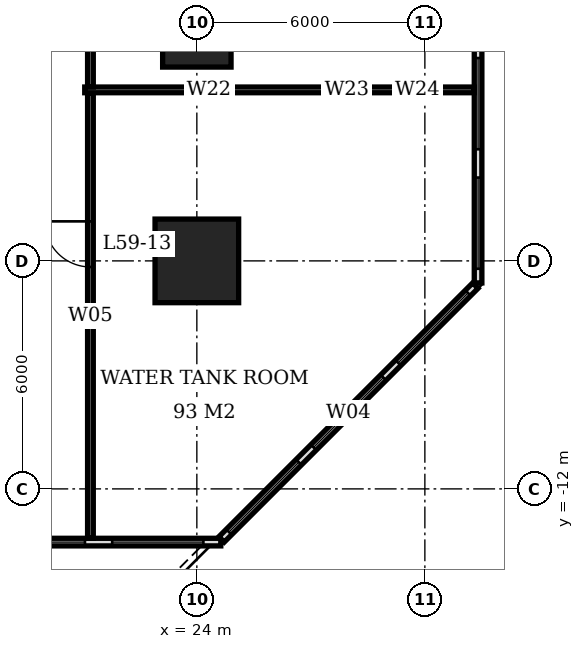
"""IFC4 building model, lengths in metres.
Left out: names, types, materials, properties, quantities, classifications, styles, units other than length and angle.
Written with IfcOpenShell. Run it as: python <this file> out.ifc"""

import sys

from ifc_helpers import new_model, si_unit, direction, frame, frame_2d, origin, origin_2d, place, context, subcontext, project, spatial, rectangle, extrude, element, fill, save


model = new_model("IFC4")
c1 = context("Model", 3, precision=1e-05, world=origin(), true_north=direction((0.0, 1.0)))
c2 = subcontext(c1, "Body", "Model", "MODEL_VIEW")
j1 = project(units=[si_unit("LENGTHUNIT", "METRE"), si_unit("PLANEANGLEUNIT", "RADIAN")], contexts=[c1])
p1 = place(None, origin())
s1 = spatial("IfcSite", under=j1, at=p1, CompositionType="ELEMENT")
p2 = place(p1, origin())
s2 = spatial("IfcBuilding", under=s1, at=p2, CompositionType="ELEMENT")
p3 = place(p2, frame((0.0, 0.0, 239.6)))
s3 = spatial("IfcBuildingStorey", under=s2, at=p3, CompositionType="ELEMENT", Elevation=239.6)
p4 = place(p3, frame((24.0, -6.0, 0.0), z_axis=(0.0, 0.0, 1.0), x_axis=(1.0, 0.0, 0.0)))
e1 = element("IfcColumn", 1, at=p4, inside=s3, PredefinedType="COLUMN", context=c2, shape_type="SweptSolid", body=[
    extrude(rectangle(XDim=2.2, YDim=2.2, at=origin_2d()), origin(), (0.0, 0.0, 1.0), 5.4),
])
p5 = place(p3, frame((24.0, 0.0, 0.0), z_axis=(0.0, 0.0, 1.0), x_axis=(1.0, 0.0, 0.0)))
e2 = element("IfcColumn", 2, at=p5, inside=s3, PredefinedType="COLUMN", context=c2, shape_type="SweptSolid", body=[
    extrude(rectangle(XDim=1.8, YDim=1.8, at=origin_2d()), origin(), (0.0, 0.0, 1.0), 5.4),
])
p6 = place(p3, frame((-6.63, -13.4, 0.0), z_axis=(0.0, 0.0, 1.0), x_axis=(1.0, 0.0, 0.0)))
e3 = element("IfcWall", 3, at=p6, inside=s3, PredefinedType="USERDEFINED", context=c2, shape_type="SweptSolid", body=[
    extrude(rectangle(XDim=31.26, YDim=0.2, at=frame_2d((15.63, 0.0))), origin(), (0.0, 0.0, 1.0), 5.4),
])
p7 = place(p6, frame((0.358, 0.0, 0.6)))
e4 = element("IfcOpeningElement", 4, at=p7, cuts=e3, PredefinedType="OPENING", context=c2, shape_type="SweptSolid", body=[
    extrude(rectangle(XDim=2.4, YDim=3.0, at=frame_2d((1.2, 1.5))), frame((0.0, 0.11, 0.0), z_axis=(0.0, -1.0, 0.0), x_axis=(1.0, 0.0, 0.0)), (0.0, 0.0, 1.0), 0.22),
])
p8 = place(p6, frame((3.474, 0.0, 0.6)))
e5 = element("IfcOpeningElement", 5, at=p8, cuts=e3, PredefinedType="OPENING", context=c2, shape_type="SweptSolid", body=[
    extrude(rectangle(XDim=2.4, YDim=3.0, at=frame_2d((1.2, 1.5))), frame((0.0, 0.11, 0.0), z_axis=(0.0, -1.0, 0.0), x_axis=(1.0, 0.0, 0.0)), (0.0, 0.0, 1.0), 0.22),
])
p9 = place(p6, frame((6.59, 0.0, 0.6)))
e6 = element("IfcOpeningElement", 6, at=p9, cuts=e3, PredefinedType="OPENING", context=c2, shape_type="SweptSolid", body=[
    extrude(rectangle(XDim=2.4, YDim=3.0, at=frame_2d((1.2, 1.5))), frame((0.0, 0.11, 0.0), z_axis=(0.0, -1.0, 0.0), x_axis=(1.0, 0.0, 0.0)), (0.0, 0.0, 1.0), 0.22),
])
p10 = place(p6, frame((9.706, 0.0, 0.6)))
e7 = element("IfcOpeningElement", 7, at=p10, cuts=e3, PredefinedType="OPENING", context=c2, shape_type="SweptSolid", body=[
    extrude(rectangle(XDim=2.4, YDim=3.0, at=frame_2d((1.2, 1.5))), frame((0.0, 0.11, 0.0), z_axis=(0.0, -1.0, 0.0), x_axis=(1.0, 0.0, 0.0)), (0.0, 0.0, 1.0), 0.22),
])
p11 = place(p6, frame((13.572, 0.0, 0.0)))
e8 = element("IfcOpeningElement", 8, at=p11, cuts=e3, PredefinedType="OPENING", context=c2, shape_type="SweptSolid", body=[
    extrude(rectangle(XDim=1.0, YDim=2.1, at=frame_2d((0.5, 1.05))), frame((0.0, 0.11, 0.0), z_axis=(0.0, -1.0, 0.0), x_axis=(1.0, 0.0, 0.0)), (0.0, 0.0, 1.0), 0.22),
])
p12 = place(p6, frame((15.938, 0.0, 0.6)))
e9 = element("IfcOpeningElement", 9, at=p12, cuts=e3, PredefinedType="OPENING", context=c2, shape_type="SweptSolid", body=[
    extrude(rectangle(XDim=2.4, YDim=3.0, at=frame_2d((1.2, 1.5))), frame((0.0, 0.11, 0.0), z_axis=(0.0, -1.0, 0.0), x_axis=(1.0, 0.0, 0.0)), (0.0, 0.0, 1.0), 0.22),
])
p13 = place(p6, frame((19.054, 0.0, 0.6)))
e10 = element("IfcOpeningElement", 10, at=p13, cuts=e3, PredefinedType="OPENING", context=c2, shape_type="SweptSolid", body=[
    extrude(rectangle(XDim=2.4, YDim=3.0, at=frame_2d((1.2, 1.5))), frame((0.0, 0.11, 0.0), z_axis=(0.0, -1.0, 0.0), x_axis=(1.0, 0.0, 0.0)), (0.0, 0.0, 1.0), 0.22),
])
p14 = place(p6, frame((22.17, 0.0, 0.6)))
e11 = element("IfcOpeningElement", 11, at=p14, cuts=e3, PredefinedType="OPENING", context=c2, shape_type="SweptSolid", body=[
    extrude(rectangle(XDim=2.4, YDim=3.0, at=frame_2d((1.2, 1.5))), frame((0.0, 0.11, 0.0), z_axis=(0.0, -1.0, 0.0), x_axis=(1.0, 0.0, 0.0)), (0.0, 0.0, 1.0), 0.22),
])
p15 = place(p6, frame((25.286, 0.0, 0.6)))
e12 = element("IfcOpeningElement", 12, at=p15, cuts=e3, PredefinedType="OPENING", context=c2, shape_type="SweptSolid", body=[
    extrude(rectangle(XDim=2.4, YDim=3.0, at=frame_2d((1.2, 1.5))), frame((0.0, 0.11, 0.0), z_axis=(0.0, -1.0, 0.0), x_axis=(1.0, 0.0, 0.0)), (0.0, 0.0, 1.0), 0.22),
])
p16 = place(p6, frame((28.402, 0.0, 0.6)))
e13 = element("IfcOpeningElement", 13, at=p16, cuts=e3, PredefinedType="OPENING", context=c2, shape_type="SweptSolid", body=[
    extrude(rectangle(XDim=2.4, YDim=3.0, at=frame_2d((1.2, 1.5))), frame((0.0, 0.11, 0.0), z_axis=(0.0, -1.0, 0.0), x_axis=(1.0, 0.0, 0.0)), (0.0, 0.0, 1.0), 0.22),
])
p17 = place(p3, frame((24.651, -13.329, 0.0), z_axis=(0.0, 0.0, 1.0), x_axis=(0.707106781187, 0.707106781187, 0.0)))
e14 = element("IfcWall", 14, at=p17, inside=s3, PredefinedType="USERDEFINED", context=c2, shape_type="SweptSolid", body=[
    extrude(rectangle(XDim=9.445, YDim=0.2, at=frame_2d((4.723, 0.0))), origin(), (0.0, 0.0, 1.0), 5.4),
])
p18 = place(p17, frame((0.274, 0.0, 0.6)))
e15 = element("IfcOpeningElement", 15, at=p18, cuts=e14, PredefinedType="OPENING", context=c2, shape_type="SweptSolid", body=[
    extrude(rectangle(XDim=2.6, YDim=3.0, at=frame_2d((1.3, 1.5))), frame((0.0, 0.11, 0.0), z_axis=(0.0, -1.0, 0.0), x_axis=(1.0, 0.0, 0.0)), (0.0, 0.0, 1.0), 0.22),
])
p19 = place(p17, frame((3.423, 0.0, 0.6)))
e16 = element("IfcOpeningElement", 16, at=p19, cuts=e14, PredefinedType="OPENING", context=c2, shape_type="SweptSolid", body=[
    extrude(rectangle(XDim=2.6, YDim=3.0, at=frame_2d((1.3, 1.5))), frame((0.0, 0.11, 0.0), z_axis=(0.0, -1.0, 0.0), x_axis=(1.0, 0.0, 0.0)), (0.0, 0.0, 1.0), 0.22),
])
p20 = place(p17, frame((6.571, 0.0, 0.6)))
e17 = element("IfcOpeningElement", 17, at=p20, cuts=e14, PredefinedType="OPENING", context=c2, shape_type="SweptSolid", body=[
    extrude(rectangle(XDim=2.6, YDim=3.0, at=frame_2d((1.3, 1.5))), frame((0.0, 0.11, 0.0), z_axis=(0.0, -1.0, 0.0), x_axis=(1.0, 0.0, 0.0)), (0.0, 0.0, 1.0), 0.22),
])
p21 = place(p3, frame((31.4, -6.58, 0.0), z_axis=(0.0, 0.0, 1.0), x_axis=(0.0, 1.0, 0.0)))
e18 = element("IfcWall", 18, at=p21, inside=s3, PredefinedType="USERDEFINED", context=c2, shape_type="SweptSolid", body=[
    extrude(rectangle(XDim=25.16, YDim=0.2, at=frame_2d((12.58, 0.0))), origin(), (0.0, 0.0, 1.0), 5.4),
])
p22 = place(p21, frame((0.373, 0.0, 0.6)))
e19 = element("IfcOpeningElement", 19, at=p22, cuts=e18, PredefinedType="OPENING", context=c2, shape_type="SweptSolid", body=[
    extrude(rectangle(XDim=2.4, YDim=3.0, at=frame_2d((1.2, 1.5))), frame((0.0, 0.11, 0.0), z_axis=(0.0, -1.0, 0.0), x_axis=(1.0, 0.0, 0.0)), (0.0, 0.0, 1.0), 0.22),
])
p23 = place(p21, frame((3.518, 0.0, 0.6)))
e20 = element("IfcOpeningElement", 20, at=p23, cuts=e18, PredefinedType="OPENING", context=c2, shape_type="SweptSolid", body=[
    extrude(rectangle(XDim=2.4, YDim=3.0, at=frame_2d((1.2, 1.5))), frame((0.0, 0.11, 0.0), z_axis=(0.0, -1.0, 0.0), x_axis=(1.0, 0.0, 0.0)), (0.0, 0.0, 1.0), 0.22),
])
p24 = place(p21, frame((6.662, 0.0, 0.6)))
e21 = element("IfcOpeningElement", 21, at=p24, cuts=e18, PredefinedType="OPENING", context=c2, shape_type="SweptSolid", body=[
    extrude(rectangle(XDim=2.4, YDim=3.0, at=frame_2d((1.2, 1.5))), frame((0.0, 0.11, 0.0), z_axis=(0.0, -1.0, 0.0), x_axis=(1.0, 0.0, 0.0)), (0.0, 0.0, 1.0), 0.22),
])
p25 = place(p21, frame((9.807, 0.0, 0.6)))
e22 = element("IfcOpeningElement", 22, at=p25, cuts=e18, PredefinedType="OPENING", context=c2, shape_type="SweptSolid", body=[
    extrude(rectangle(XDim=2.4, YDim=3.0, at=frame_2d((1.2, 1.5))), frame((0.0, 0.11, 0.0), z_axis=(0.0, -1.0, 0.0), x_axis=(1.0, 0.0, 0.0)), (0.0, 0.0, 1.0), 0.22),
])
p26 = place(p21, frame((12.952, 0.0, 0.6)))
e23 = element("IfcOpeningElement", 23, at=p26, cuts=e18, PredefinedType="OPENING", context=c2, shape_type="SweptSolid", body=[
    extrude(rectangle(XDim=2.4, YDim=3.0, at=frame_2d((1.2, 1.5))), frame((0.0, 0.11, 0.0), z_axis=(0.0, -1.0, 0.0), x_axis=(1.0, 0.0, 0.0)), (0.0, 0.0, 1.0), 0.22),
])
p27 = place(p21, frame((16.097, 0.0, 0.6)))
e24 = element("IfcOpeningElement", 24, at=p27, cuts=e18, PredefinedType="OPENING", context=c2, shape_type="SweptSolid", body=[
    extrude(rectangle(XDim=2.4, YDim=3.0, at=frame_2d((1.2, 1.5))), frame((0.0, 0.11, 0.0), z_axis=(0.0, -1.0, 0.0), x_axis=(1.0, 0.0, 0.0)), (0.0, 0.0, 1.0), 0.22),
])
p28 = place(p21, frame((19.242, 0.0, 0.6)))
e25 = element("IfcOpeningElement", 25, at=p28, cuts=e18, PredefinedType="OPENING", context=c2, shape_type="SweptSolid", body=[
    extrude(rectangle(XDim=2.4, YDim=3.0, at=frame_2d((1.2, 1.5))), frame((0.0, 0.11, 0.0), z_axis=(0.0, -1.0, 0.0), x_axis=(1.0, 0.0, 0.0)), (0.0, 0.0, 1.0), 0.22),
])
p29 = place(p21, frame((22.387, 0.0, 0.6)))
e26 = element("IfcOpeningElement", 26, at=p29, cuts=e18, PredefinedType="OPENING", context=c2, shape_type="SweptSolid", body=[
    extrude(rectangle(XDim=2.4, YDim=3.0, at=frame_2d((1.2, 1.5))), frame((0.0, 0.11, 0.0), z_axis=(0.0, -1.0, 0.0), x_axis=(1.0, 0.0, 0.0)), (0.0, 0.0, 1.0), 0.22),
])
p30 = place(p3, frame((21.2, -13.3, 0.0), z_axis=(0.0, 0.0, 1.0), x_axis=(0.0, 1.0, 0.0)))
e27 = element("IfcWall", 27, at=p30, inside=s3, PredefinedType="PARTITIONING", context=c2, shape_type="SweptSolid", body=[
    extrude(rectangle(XDim=11.725, YDim=0.15, at=frame_2d((5.863, 0.0))), origin(), (0.0, 0.0, 1.0), 5.15),
])
p31 = place(p30, frame((7.14, 0.0, 0.0)))
e28 = element("IfcOpeningElement", 28, at=p31, cuts=e27, PredefinedType="OPENING", context=c2, shape_type="SweptSolid", body=[
    extrude(rectangle(XDim=1.2, YDim=2.4, at=frame_2d((0.6, 1.2))), frame((0.0, 0.085, 0.0), z_axis=(0.0, -1.0, 0.0), x_axis=(1.0, 0.0, 0.0)), (0.0, 0.0, 1.0), 0.17),
])
p32 = place(p3, frame((21.2, -1.425, 0.0), z_axis=(0.0, 0.0, 1.0), x_axis=(0.0, 1.0, 0.0)))
e29 = element("IfcWall", 29, at=p32, inside=s3, PredefinedType="PARTITIONING", context=c2, shape_type="SweptSolid", body=[
    extrude(rectangle(XDim=8.85, YDim=0.15, at=frame_2d((4.425, 0.0))), origin(), (0.0, 0.0, 1.0), 5.15),
])
p33 = place(p32, frame((5.175, 0.0, 0.0)))
e30 = element("IfcOpeningElement", 30, at=p33, cuts=e29, PredefinedType="OPENING", context=c2, shape_type="SweptSolid", body=[
    extrude(rectangle(XDim=1.2, YDim=2.4, at=frame_2d((0.6, 1.2))), frame((0.0, 0.085, 0.0), z_axis=(0.0, -1.0, 0.0), x_axis=(1.0, 0.0, 0.0)), (0.0, 0.0, 1.0), 0.17),
])
p34 = place(p3, frame((21.05, -1.5, 0.0), z_axis=(0.0, 0.0, 1.0), x_axis=(1.0, 0.0, 0.0)))
e31 = element("IfcWall", 31, at=p34, inside=s3, PredefinedType="PARTITIONING", context=c2, shape_type="SweptSolid", body=[
    extrude(rectangle(XDim=6.54, YDim=0.15, at=frame_2d((3.27, 0.0))), origin(), (0.0, 0.0, 1.0), 5.15),
])
p35 = place(p3, frame((27.59, -1.5, 0.0), z_axis=(0.0, 0.0, 1.0), x_axis=(1.0, 0.0, 0.0)))
e32 = element("IfcWall", 32, at=p35, inside=s3, PredefinedType="PARTITIONING", context=c2, shape_type="SweptSolid", body=[
    extrude(rectangle(XDim=0.72, YDim=0.15, at=frame_2d((0.36, 0.0))), origin(), (0.0, 0.0, 1.0), 4.15),
])
p36 = place(p3, frame((28.31, -1.5, 0.0), z_axis=(0.0, 0.0, 1.0), x_axis=(1.0, 0.0, 0.0)))
e33 = element("IfcWall", 33, at=p36, inside=s3, PredefinedType="PARTITIONING", context=c2, shape_type="SweptSolid", body=[
    extrude(rectangle(XDim=2.99, YDim=0.15, at=frame_2d((1.495, 0.0))), origin(), (0.0, 0.0, 1.0), 5.15),
])
p37 = place(p15, origin())
e34 = element("IfcWindow", 34, at=p37, inside=s3, PartitioningType="SINGLE_PANEL", PredefinedType="USERDEFINED", context=c2, shape_type="SweptSolid", body=[
    extrude(rectangle(XDim=2.4, YDim=3.0, at=frame_2d((1.2, 1.5))), frame((0.0, 0.03, 0.0), z_axis=(0.0, -1.0, 0.0), x_axis=(1.0, 0.0, 0.0)), (0.0, 0.0, 1.0), 0.06),
])
fill(e12, e34)
p38 = place(p16, origin())
e35 = element("IfcWindow", 35, at=p38, inside=s3, PartitioningType="SINGLE_PANEL", PredefinedType="USERDEFINED", context=c2, shape_type="SweptSolid", body=[
    extrude(rectangle(XDim=2.4, YDim=3.0, at=frame_2d((1.2, 1.5))), frame((0.0, 0.03, 0.0), z_axis=(0.0, -1.0, 0.0), x_axis=(1.0, 0.0, 0.0)), (0.0, 0.0, 1.0), 0.06),
])
fill(e13, e35)
p39 = place(p18, origin())
e36 = element("IfcWindow", 36, at=p39, inside=s3, PartitioningType="SINGLE_PANEL", PredefinedType="USERDEFINED", context=c2, shape_type="SweptSolid", body=[
    extrude(rectangle(XDim=2.6, YDim=3.0, at=frame_2d((1.3, 1.5))), frame((0.0, 0.03, 0.0), z_axis=(0.0, -1.0, 0.0), x_axis=(1.0, 0.0, 0.0)), (0.0, 0.0, 1.0), 0.06),
])
fill(e15, e36)
p40 = place(p19, origin())
e37 = element("IfcWindow", 37, at=p40, inside=s3, PartitioningType="SINGLE_PANEL", PredefinedType="USERDEFINED", context=c2, shape_type="SweptSolid", body=[
    extrude(rectangle(XDim=2.6, YDim=3.0, at=frame_2d((1.3, 1.5))), frame((0.0, 0.03, 0.0), z_axis=(0.0, -1.0, 0.0), x_axis=(1.0, 0.0, 0.0)), (0.0, 0.0, 1.0), 0.06),
])
fill(e16, e37)
p41 = place(p20, origin())
e38 = element("IfcWindow", 38, at=p41, inside=s3, PartitioningType="SINGLE_PANEL", PredefinedType="USERDEFINED", context=c2, shape_type="SweptSolid", body=[
    extrude(rectangle(XDim=2.6, YDim=3.0, at=frame_2d((1.3, 1.5))), frame((0.0, 0.03, 0.0), z_axis=(0.0, -1.0, 0.0), x_axis=(1.0, 0.0, 0.0)), (0.0, 0.0, 1.0), 0.06),
])
fill(e17, e38)
p42 = place(p22, origin())
e39 = element("IfcWindow", 39, at=p42, inside=s3, PartitioningType="SINGLE_PANEL", PredefinedType="USERDEFINED", context=c2, shape_type="SweptSolid", body=[
    extrude(rectangle(XDim=2.4, YDim=3.0, at=frame_2d((1.2, 1.5))), frame((0.0, 0.03, 0.0), z_axis=(0.0, -1.0, 0.0), x_axis=(1.0, 0.0, 0.0)), (0.0, 0.0, 1.0), 0.06),
])
fill(e19, e39)
p43 = place(p23, origin())
e40 = element("IfcWindow", 40, at=p43, inside=s3, PartitioningType="SINGLE_PANEL", PredefinedType="USERDEFINED", context=c2, shape_type="SweptSolid", body=[
    extrude(rectangle(XDim=2.4, YDim=3.0, at=frame_2d((1.2, 1.5))), frame((0.0, 0.03, 0.0), z_axis=(0.0, -1.0, 0.0), x_axis=(1.0, 0.0, 0.0)), (0.0, 0.0, 1.0), 0.06),
])
fill(e20, e40)
p44 = place(p31, origin())
e41 = element("IfcDoor", 41, at=p44, inside=s3, OperationType="SINGLE_SWING_RIGHT", PredefinedType="DOOR", context=c2, shape_type="SweptSolid", body=[
    extrude(rectangle(XDim=1.2, YDim=2.4, at=frame_2d((0.6, 1.2))), frame((0.0, 0.025, 0.0), z_axis=(0.0, -1.0, 0.0), x_axis=(1.0, 0.0, 0.0)), (0.0, 0.0, 1.0), 0.05),
])
fill(e28, e41)
save(model, sys.argv[1])
